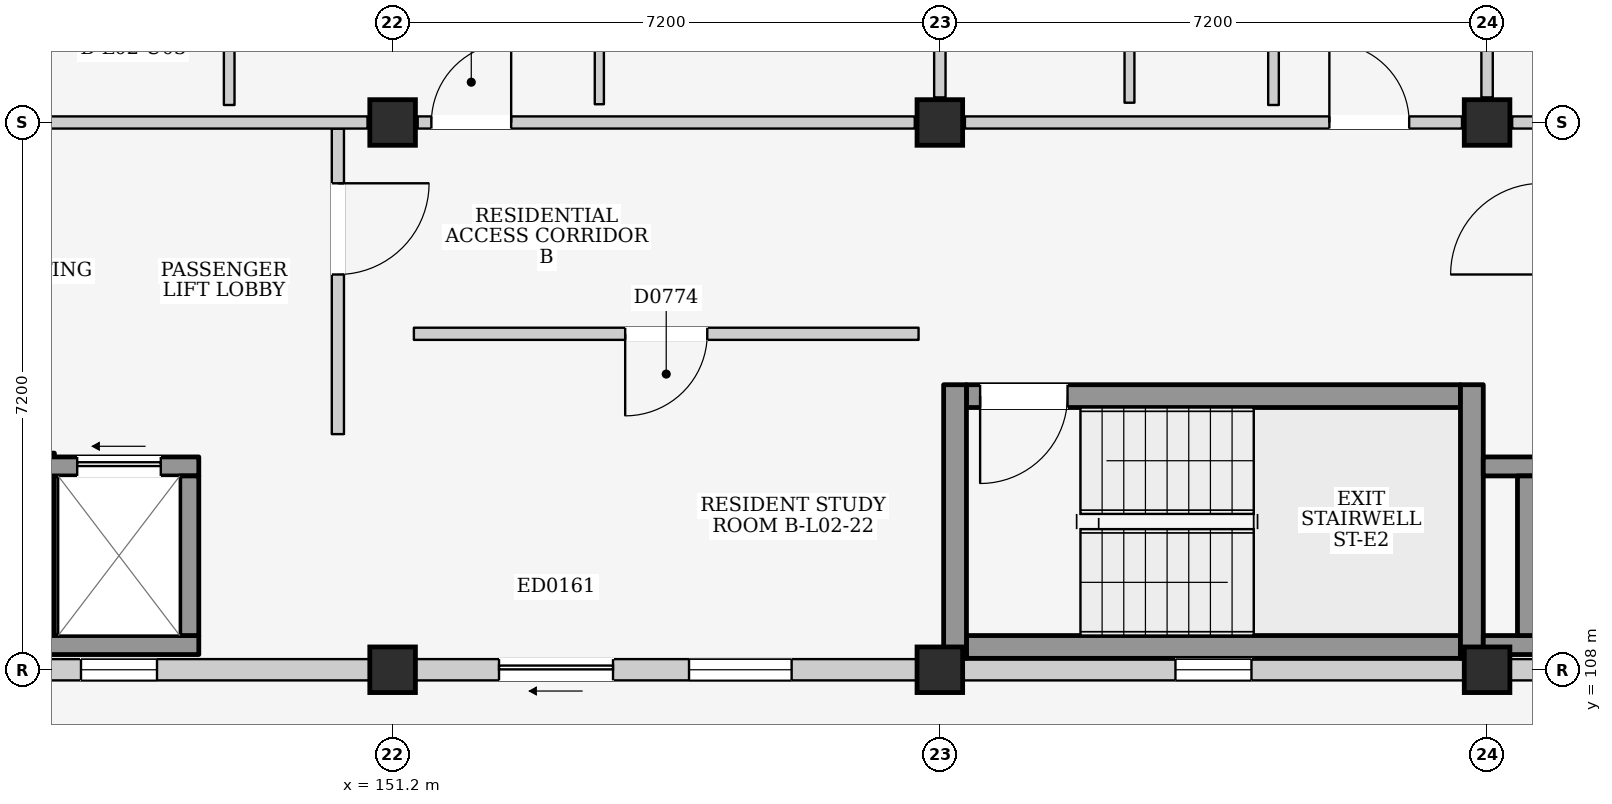
"""IFC4 building model, lengths in metres.
Left out: names, types, materials, properties, quantities, classifications, styles, units other than length and angle.
Written with IfcOpenShell. Run it as: python <this file> out.ifc"""

import sys

from ifc_helpers import new_model, si_unit, direction, frame, frame_2d, origin, origin_2d, place, context, subcontext, project, spatial, rectangle, extrude, element, fill, save


model = new_model("IFC4")
c1 = context("Model", 3, precision=1e-05, world=origin(), true_north=direction((0.0, 1.0)))
c2 = subcontext(c1, "Body", "Model", "MODEL_VIEW")
j1 = project(units=[si_unit("LENGTHUNIT", "METRE"), si_unit("PLANEANGLEUNIT", "RADIAN")], contexts=[c1])
p1 = place(None, origin())
s1 = spatial("IfcSite", under=j1, at=p1, CompositionType="ELEMENT")
p2 = place(p1, origin())
s2 = spatial("IfcBuilding", under=s1, at=p2, CompositionType="ELEMENT")
p3 = place(p2, frame((0.0, 0.0, 9.0)))
s3 = spatial("IfcBuildingStorey", under=s2, at=p3, CompositionType="ELEMENT", Elevation=9.0)
for number, where, z_axis, x_axis in (
    (1, (151.2, 108.0, 0.0), (0.0, 0.0, 1.0), (1.0, 0.0, 0.0)),
    (2, (151.2, 115.2, 0.0), (0.0, 0.0, 1.0), (1.0, 0.0, 0.0)),
    (3, (158.4, 108.0, 0.0), (0.0, 0.0, 1.0), (1.0, 0.0, 0.0)),
    (4, (158.4, 115.2, 0.0), (0.0, 0.0, 1.0), (1.0, 0.0, 0.0)),
    (5, (165.6, 108.0, 0.0), (0.0, 0.0, 1.0), (1.0, 0.0, 0.0)),
    (6, (165.6, 115.2, 0.0), (0.0, 0.0, 1.0), (1.0, 0.0, 0.0)),
):
    element("IfcColumn", number, at=place(p3, frame(where, z_axis=z_axis, x_axis=x_axis)), inside=s3, PredefinedType="COLUMN", context=c2, shape_type="SweptSolid", body=[
        extrude(rectangle(XDim=0.6, YDim=0.6, at=origin_2d()), origin(), (0.0, 0.0, 1.0), 3.2),
    ])
p4 = place(p3, frame((144.3, 108.0, 0.0), z_axis=(0.0, 0.0, 1.0), x_axis=(1.0, 0.0, 0.0)))
e7 = element("IfcWall", 7, at=p4, inside=s3, PredefinedType="ELEMENTEDWALL", context=c2, shape_type="SweptSolid", body=[
    extrude(rectangle(XDim=6.6, YDim=0.28, at=frame_2d((3.3, 0.0))), origin(), (0.0, 0.0, 1.0), 2.345),
])
p5 = place(p4, frame((2.8, 0.0, 1.2)))
e8 = element("IfcOpeningElement", 8, at=p5, cuts=e7, PredefinedType="OPENING", context=c2, shape_type="SweptSolid", body=[
    extrude(rectangle(XDim=1.0, YDim=0.9, at=frame_2d((0.5, 0.45))), frame((0.0, 0.155, 0.0), z_axis=(0.0, -1.0, 0.0), x_axis=(1.0, 0.0, 0.0)), (0.0, 0.0, 1.0), 0.31),
])
p6 = place(p3, frame((151.5, 108.0, 0.0), z_axis=(0.0, 0.0, 1.0), x_axis=(1.0, 0.0, 0.0)))
e9 = element("IfcWall", 9, at=p6, inside=s3, PredefinedType="ELEMENTEDWALL", context=c2, shape_type="SweptSolid", body=[
    extrude(rectangle(XDim=6.6, YDim=0.28, at=frame_2d((3.3, 0.0))), origin(), (0.0, 0.0, 1.0), 2.345),
])
p7 = place(p6, frame((1.1, 0.0, 0.0)))
e10 = element("IfcOpeningElement", 10, at=p7, cuts=e9, PredefinedType="OPENING", context=c2, shape_type="SweptSolid", body=[
    extrude(rectangle(XDim=1.5, YDim=2.12, at=frame_2d((0.75, 1.06))), frame((0.0, 0.155, 0.0), z_axis=(0.0, -1.0, 0.0), x_axis=(1.0, 0.0, 0.0)), (0.0, 0.0, 1.0), 0.31),
])
p8 = place(p6, frame((3.6, 0.0, 0.735)))
e11 = element("IfcOpeningElement", 11, at=p8, cuts=e9, PredefinedType="OPENING", context=c2, shape_type="SweptSolid", body=[
    extrude(rectangle(XDim=1.35, YDim=1.5, at=frame_2d((0.675, 0.75))), frame((0.0, 0.155, 0.0), z_axis=(0.0, -1.0, 0.0), x_axis=(1.0, 0.0, 0.0)), (0.0, 0.0, 1.0), 0.31),
])
p9 = place(p3, frame((158.7, 108.0, 0.0), z_axis=(0.0, 0.0, 1.0), x_axis=(1.0, 0.0, 0.0)))
e12 = element("IfcWall", 12, at=p9, inside=s3, PredefinedType="ELEMENTEDWALL", context=c2, shape_type="SweptSolid", body=[
    extrude(rectangle(XDim=6.6, YDim=0.28, at=frame_2d((3.3, 0.0))), origin(), (0.0, 0.0, 1.0), 2.345),
])
p10 = place(p9, frame((2.8, 0.0, 1.2)))
e13 = element("IfcOpeningElement", 13, at=p10, cuts=e12, PredefinedType="OPENING", context=c2, shape_type="SweptSolid", body=[
    extrude(rectangle(XDim=1.0, YDim=0.9, at=frame_2d((0.5, 0.45))), frame((0.0, 0.155, 0.0), z_axis=(0.0, -1.0, 0.0), x_axis=(1.0, 0.0, 0.0)), (0.0, 0.0, 1.0), 0.31),
])
p11 = place(p3, frame((165.9, 108.0, 0.0), z_axis=(0.0, 0.0, 1.0), x_axis=(1.0, 0.0, 0.0)))
e14 = element("IfcWall", 14, at=p11, inside=s3, PredefinedType="ELEMENTEDWALL", context=c2, shape_type="SweptSolid", body=[
    extrude(rectangle(XDim=6.6, YDim=0.28, at=frame_2d((3.3, 0.0))), origin(), (0.0, 0.0, 1.0), 2.345),
])
p12 = place(p11, frame((2.8, 0.0, 1.2)))
e15 = element("IfcOpeningElement", 15, at=p12, cuts=e14, PredefinedType="OPENING", context=c2, shape_type="SweptSolid", body=[
    extrude(rectangle(XDim=1.0, YDim=0.9, at=frame_2d((0.5, 0.45))), frame((0.0, 0.155, 0.0), z_axis=(0.0, -1.0, 0.0), x_axis=(1.0, 0.0, 0.0)), (0.0, 0.0, 1.0), 0.31),
])
p13 = place(p3, frame((150.48, 111.1, 0.0), z_axis=(0.0, 0.0, 1.0), x_axis=(0.0, 1.0, 0.0)))
e16 = element("IfcWall", 16, at=p13, inside=s3, PredefinedType="PARTITIONING", context=c2, shape_type="SweptSolid", body=[
    extrude(rectangle(XDim=4.02, YDim=0.16, at=frame_2d((2.01, 0.0))), origin(), (0.0, 0.0, 1.0), 2.96),
])
p14 = place(p13, frame((2.1, 0.0, 0.0)))
e17 = element("IfcOpeningElement", 17, at=p14, cuts=e16, PredefinedType="OPENING", context=c2, shape_type="SweptSolid", body=[
    extrude(rectangle(XDim=1.2, YDim=2.2, at=frame_2d((0.6, 1.1))), frame((0.0, 0.095, 0.0), z_axis=(0.0, -1.0, 0.0), x_axis=(1.0, 0.0, 0.0)), (0.0, 0.0, 1.0), 0.19),
])
p15 = place(p3, frame((146.625, 108.45, 0.0), z_axis=(0.0, 0.0, 1.0), x_axis=(0.0, 1.0, 0.0)))
e18 = element("IfcWall", 18, at=p15, inside=s3, PredefinedType="SHEAR", context=c2, shape_type="SweptSolid", body=[
    extrude(rectangle(XDim=2.4, YDim=0.25, at=frame_2d((1.2, 0.0))), origin(), (0.0, 0.0, 1.0), 2.96),
])
p16 = place(p3, frame((146.625, 108.325, 0.0), z_axis=(0.0, 0.0, 1.0), x_axis=(1.0, 0.0, 0.0)))
e19 = element("IfcWall", 19, at=p16, inside=s3, PredefinedType="SHEAR", context=c2, shape_type="SweptSolid", body=[
    extrude(rectangle(XDim=2.025, YDim=0.25, at=frame_2d((1.012, 0.0))), origin(), (0.0, 0.0, 1.0), 2.96),
])
p17 = place(p3, frame((146.625, 110.675, 0.0), z_axis=(0.0, 0.0, 1.0), x_axis=(1.0, 0.0, 0.0)))
e20 = element("IfcWall", 20, at=p17, inside=s3, PredefinedType="SHEAR", context=c2, shape_type="SweptSolid", body=[
    extrude(rectangle(XDim=2.025, YDim=0.25, at=frame_2d((1.012, 0.0))), origin(), (0.0, 0.0, 1.0), 2.96),
])
p18 = place(p17, frame((0.425, 0.0, 0.0)))
e21 = element("IfcOpeningElement", 21, at=p18, cuts=e20, PredefinedType="OPENING", context=c2, shape_type="SweptSolid", body=[
    extrude(rectangle(XDim=1.1, YDim=2.15, at=frame_2d((0.55, 1.075))), frame((0.0, 0.14, 0.0), z_axis=(0.0, -1.0, 0.0), x_axis=(1.0, 0.0, 0.0)), (0.0, 0.0, 1.0), 0.28),
])
p19 = place(p3, frame((148.525, 108.45, 0.0), z_axis=(0.0, 0.0, 1.0), x_axis=(0.0, 1.0, 0.0)))
e22 = element("IfcWall", 22, at=p19, inside=s3, PredefinedType="SHEAR", context=c2, shape_type="SweptSolid", body=[
    extrude(rectangle(XDim=2.1, YDim=0.25, at=frame_2d((1.05, 0.0))), origin(), (0.0, 0.0, 1.0), 2.96),
])
p20 = place(p3, frame((158.75, 108.3, 0.0), z_axis=(0.0, 0.0, 1.0), x_axis=(1.0, 0.0, 0.0)))
e23 = element("IfcWall", 23, at=p20, inside=s3, PredefinedType="SHEAR", context=c2, shape_type="SweptSolid", body=[
    extrude(rectangle(XDim=6.5, YDim=0.3, at=frame_2d((3.25, 0.0))), origin(), (0.0, 0.0, 1.0), 2.96),
])
p21 = place(p3, frame((158.75, 111.6, 0.0), z_axis=(0.0, 0.0, 1.0), x_axis=(1.0, 0.0, 0.0)))
e24 = element("IfcWall", 24, at=p21, inside=s3, PredefinedType="SHEAR", context=c2, shape_type="SweptSolid", body=[
    extrude(rectangle(XDim=6.5, YDim=0.3, at=frame_2d((3.25, 0.0))), origin(), (0.0, 0.0, 1.0), 2.96),
])
p22 = place(p21, frame((0.18, 0.0, 0.0)))
e25 = element("IfcOpeningElement", 25, at=p22, cuts=e24, PredefinedType="OPENING", context=c2, shape_type="SweptSolid", body=[
    extrude(rectangle(XDim=1.15, YDim=2.2, at=frame_2d((0.575, 1.1))), frame((0.0, 0.165, 0.0), z_axis=(0.0, -1.0, 0.0), x_axis=(1.0, 0.0, 0.0)), (0.0, 0.0, 1.0), 0.33),
])
for number, where, z_axis, x_axis in (
    (26, (158.6, 108.15, 0.0), (0.0, 0.0, 1.0), (0.0, 1.0, 0.0)),
    (27, (165.4, 108.15, 0.0), (0.0, 0.0, 1.0), (0.0, 1.0, 0.0)),
):
    element("IfcWall", number, at=place(p3, frame(where, z_axis=z_axis, x_axis=x_axis)), inside=s3, PredefinedType="SHEAR", context=c2, shape_type="SweptSolid", body=[
        extrude(rectangle(XDim=3.6, YDim=0.3, at=frame_2d((1.8, 0.0))), origin(), (0.0, 0.0, 1.0), 2.96),
    ])
p23 = place(p3, frame((165.55, 108.325, 0.0), z_axis=(0.0, 0.0, 1.0), x_axis=(1.0, 0.0, 0.0)))
e28 = element("IfcWall", 28, at=p23, inside=s3, PredefinedType="SHEAR", context=c2, shape_type="SweptSolid", body=[
    extrude(rectangle(XDim=2.55, YDim=0.25, at=frame_2d((1.275, 0.0))), origin(), (0.0, 0.0, 1.0), 2.96),
])
p24 = place(p3, frame((165.55, 110.675, 0.0), z_axis=(0.0, 0.0, 1.0), x_axis=(1.0, 0.0, 0.0)))
e29 = element("IfcWall", 29, at=p24, inside=s3, PredefinedType="SHEAR", context=c2, shape_type="SweptSolid", body=[
    extrude(rectangle(XDim=2.55, YDim=0.25, at=frame_2d((1.275, 0.0))), origin(), (0.0, 0.0, 1.0), 2.96),
])
p25 = place(p24, frame((0.95, 0.0, 0.0)))
e30 = element("IfcOpeningElement", 30, at=p25, cuts=e29, PredefinedType="OPENING", context=c2, shape_type="SweptSolid", body=[
    extrude(rectangle(XDim=1.1, YDim=2.15, at=frame_2d((0.55, 1.075))), frame((0.0, 0.14, 0.0), z_axis=(0.0, -1.0, 0.0), x_axis=(1.0, 0.0, 0.0)), (0.0, 0.0, 1.0), 0.28),
])
p26 = place(p3, frame((166.125, 108.45, 0.0), z_axis=(0.0, 0.0, 1.0), x_axis=(0.0, 1.0, 0.0)))
e31 = element("IfcWall", 31, at=p26, inside=s3, PredefinedType="SHEAR", context=c2, shape_type="SweptSolid", body=[
    extrude(rectangle(XDim=2.1, YDim=0.25, at=frame_2d((1.05, 0.0))), origin(), (0.0, 0.0, 1.0), 2.96),
])
p27 = place(p3, frame((144.33, 115.2, 0.0), z_axis=(0.0, 0.0, 1.0), x_axis=(1.0, 0.0, 0.0)))
e32 = element("IfcWall", 32, at=p27, inside=s3, PredefinedType="PARTITIONING", context=c2, shape_type="SweptSolid", body=[
    extrude(rectangle(XDim=6.54, YDim=0.16, at=frame_2d((3.27, 0.0))), origin(), (0.0, 0.0, 1.0), 2.345),
])
p28 = place(p3, frame((151.53, 115.2, 0.0), z_axis=(0.0, 0.0, 1.0), x_axis=(1.0, 0.0, 0.0)))
e33 = element("IfcWall", 33, at=p28, inside=s3, PredefinedType="PARTITIONING", context=c2, shape_type="SweptSolid", body=[
    extrude(rectangle(XDim=6.54, YDim=0.16, at=frame_2d((3.27, 0.0))), origin(), (0.0, 0.0, 1.0), 2.345),
])
p29 = place(p28, frame((0.18, 0.0, 0.0)))
e34 = element("IfcOpeningElement", 34, at=p29, cuts=e33, PredefinedType="OPENING", context=c2, shape_type="SweptSolid", body=[
    extrude(rectangle(XDim=1.05, YDim=2.15, at=frame_2d((0.525, 1.075))), frame((0.0, 0.095, 0.0), z_axis=(0.0, -1.0, 0.0), x_axis=(1.0, 0.0, 0.0)), (0.0, 0.0, 1.0), 0.19),
])
p30 = place(p3, frame((158.4, 115.53, 0.0), z_axis=(0.0, 0.0, 1.0), x_axis=(0.0, 1.0, 0.0)))
e35 = element("IfcWall", 35, at=p30, inside=s3, PredefinedType="PARTITIONING", context=c2, shape_type="SweptSolid", body=[
    extrude(rectangle(XDim=6.54, YDim=0.15, at=frame_2d((3.27, 0.0))), origin(), (0.0, 0.0, 1.0), 2.395),
])
p31 = place(p3, frame((149.05, 115.43, 0.0), z_axis=(0.0, 0.0, 1.0), x_axis=(0.0, 1.0, 0.0)))
e36 = element("IfcWall", 36, at=p31, inside=s3, PredefinedType="PARTITIONING", context=c2, shape_type="SweptSolid", body=[
    extrude(rectangle(XDim=3.06, YDim=0.14, at=frame_2d((1.53, 0.0))), origin(), (0.0, 0.0, 1.0), 2.96),
])
p32 = place(p3, frame((153.92, 115.44, 0.0), z_axis=(0.0, 0.0, 1.0), x_axis=(0.0, 1.0, 0.0)))
e37 = element("IfcWall", 37, at=p32, inside=s3, PredefinedType="PARTITIONING", context=c2, shape_type="SweptSolid", body=[
    extrude(rectangle(XDim=3.04, YDim=0.12, at=frame_2d((1.52, 0.0))), origin(), (0.0, 0.0, 1.0), 2.96),
])
p33 = place(p32, frame((1.04, 0.0, 0.0)))
e38 = element("IfcOpeningElement", 38, at=p33, cuts=e37, PredefinedType="OPENING", context=c2, shape_type="SweptSolid", body=[
    extrude(rectangle(XDim=0.96, YDim=2.15, at=frame_2d((0.48, 1.075))), frame((0.0, 0.075, 0.0), z_axis=(0.0, -1.0, 0.0), x_axis=(1.0, 0.0, 0.0)), (0.0, 0.0, 1.0), 0.15),
])
p34 = place(p3, frame((158.73, 115.2, 0.0), z_axis=(0.0, 0.0, 1.0), x_axis=(1.0, 0.0, 0.0)))
e39 = element("IfcWall", 39, at=p34, inside=s3, PredefinedType="PARTITIONING", context=c2, shape_type="SweptSolid", body=[
    extrude(rectangle(XDim=6.54, YDim=0.16, at=frame_2d((3.27, 0.0))), origin(), (0.0, 0.0, 1.0), 2.345),
])
p35 = place(p34, frame((4.795, 0.0, 0.0)))
e40 = element("IfcOpeningElement", 40, at=p35, cuts=e39, PredefinedType="OPENING", context=c2, shape_type="SweptSolid", body=[
    extrude(rectangle(XDim=1.05, YDim=2.15, at=frame_2d((0.525, 1.075))), frame((0.0, 0.095, 0.0), z_axis=(0.0, -1.0, 0.0), x_axis=(1.0, 0.0, 0.0)), (0.0, 0.0, 1.0), 0.19),
])
p36 = place(p3, frame((165.6, 115.53, 0.0), z_axis=(0.0, 0.0, 1.0), x_axis=(0.0, 1.0, 0.0)))
e41 = element("IfcWall", 41, at=p36, inside=s3, PredefinedType="PARTITIONING", context=c2, shape_type="SweptSolid", body=[
    extrude(rectangle(XDim=6.54, YDim=0.15, at=frame_2d((3.27, 0.0))), origin(), (0.0, 0.0, 1.0), 2.395),
])
p37 = place(p3, frame((160.895, 115.46, 0.0), z_axis=(0.0, 0.0, 1.0), x_axis=(0.0, 1.0, 0.0)))
e42 = element("IfcWall", 42, at=p37, inside=s3, PredefinedType="PARTITIONING", context=c2, shape_type="SweptSolid", body=[
    extrude(rectangle(XDim=2.33, YDim=0.13, at=frame_2d((1.165, 0.0))), origin(), (0.0, 0.0, 1.0), 2.96),
])
p38 = place(p3, frame((162.79, 115.43, 0.0), z_axis=(0.0, 0.0, 1.0), x_axis=(0.0, 1.0, 0.0)))
e43 = element("IfcWall", 43, at=p38, inside=s3, PredefinedType="PARTITIONING", context=c2, shape_type="SweptSolid", body=[
    extrude(rectangle(XDim=2.35, YDim=0.14, at=frame_2d((1.175, 0.0))), origin(), (0.0, 0.0, 1.0), 2.96),
])
p39 = place(p3, frame((165.93, 115.2, 0.0), z_axis=(0.0, 0.0, 1.0), x_axis=(1.0, 0.0, 0.0)))
e44 = element("IfcWall", 44, at=p39, inside=s3, PredefinedType="PARTITIONING", context=c2, shape_type="SweptSolid", body=[
    extrude(rectangle(XDim=6.54, YDim=0.16, at=frame_2d((3.27, 0.0))), origin(), (0.0, 0.0, 1.0), 2.345),
])
p40 = place(p3, frame((151.48, 112.42, 0.0), z_axis=(0.0, 0.0, 1.0), x_axis=(1.0, 0.0, 0.0)))
e45 = element("IfcWall", 45, at=p40, inside=s3, PredefinedType="PARTITIONING", context=c2, shape_type="SweptSolid", body=[
    extrude(rectangle(XDim=6.64, YDim=0.16, at=frame_2d((3.32, 0.0))), origin(), (0.0, 0.0, 1.0), 2.96),
])
p41 = place(p40, frame((2.78, 0.0, 0.0)))
e46 = element("IfcOpeningElement", 46, at=p41, cuts=e45, PredefinedType="OPENING", context=c2, shape_type="SweptSolid", body=[
    extrude(rectangle(XDim=1.08, YDim=2.22, at=frame_2d((0.54, 1.11))), frame((0.0, 0.095, 0.0), z_axis=(0.0, -1.0, 0.0), x_axis=(1.0, 0.0, 0.0)), (0.0, 0.0, 1.0), 0.19),
])
p42 = place(p5, origin())
e47 = element("IfcWindow", 47, at=p42, inside=s3, PartitioningType="SINGLE_PANEL", PredefinedType="WINDOW", context=c2, shape_type="SweptSolid", body=[
    extrude(rectangle(XDim=1.0, YDim=0.9, at=frame_2d((0.5, 0.45))), frame((0.0, 0.03, 0.0), z_axis=(0.0, -1.0, 0.0), x_axis=(1.0, 0.0, 0.0)), (0.0, 0.0, 1.0), 0.06),
])
fill(e8, e47)
p43 = place(p7, frame((1.5, 0.0, 0.0), z_axis=(0.0, 0.0, 1.0), x_axis=(-1.0, 0.0, 0.0)))
e48 = element("IfcDoor", 48, at=p43, inside=s3, OperationType="SLIDING_TO_LEFT", PredefinedType="DOOR", context=c2, shape_type="SweptSolid", body=[
    extrude(rectangle(XDim=1.5, YDim=2.12, at=frame_2d((0.75, 1.06))), frame((0.0, 0.025, 0.0), z_axis=(0.0, -1.0, 0.0), x_axis=(1.0, 0.0, 0.0)), (0.0, 0.0, 1.0), 0.05),
])
fill(e10, e48)
p44 = place(p8, origin())
e49 = element("IfcWindow", 49, at=p44, inside=s3, PartitioningType="SINGLE_PANEL", PredefinedType="WINDOW", context=c2, shape_type="SweptSolid", body=[
    extrude(rectangle(XDim=1.35, YDim=1.5, at=frame_2d((0.675, 0.75))), frame((0.0, 0.03, 0.0), z_axis=(0.0, -1.0, 0.0), x_axis=(1.0, 0.0, 0.0)), (0.0, 0.0, 1.0), 0.06),
])
fill(e11, e49)
p45 = place(p10, origin())
e50 = element("IfcWindow", 50, at=p45, inside=s3, PartitioningType="SINGLE_PANEL", PredefinedType="WINDOW", context=c2, shape_type="SweptSolid", body=[
    extrude(rectangle(XDim=1.0, YDim=0.9, at=frame_2d((0.5, 0.45))), frame((0.0, 0.03, 0.0), z_axis=(0.0, -1.0, 0.0), x_axis=(1.0, 0.0, 0.0)), (0.0, 0.0, 1.0), 0.06),
])
fill(e13, e50)
p46 = place(p14, frame((1.2, 0.0, 0.0), z_axis=(0.0, 0.0, 1.0), x_axis=(-1.0, 0.0, 0.0)))
e51 = element("IfcDoor", 51, at=p46, inside=s3, OperationType="SINGLE_SWING_LEFT", PredefinedType="DOOR", context=c2, shape_type="SweptSolid", body=[
    extrude(rectangle(XDim=1.2, YDim=2.2, at=frame_2d((0.6, 1.1))), frame((0.0, 0.025, 0.0), z_axis=(0.0, -1.0, 0.0), x_axis=(1.0, 0.0, 0.0)), (0.0, 0.0, 1.0), 0.05),
])
fill(e17, e51)
p47 = place(p18, origin())
e52 = element("IfcDoor", 52, at=p47, inside=s3, OperationType="SLIDING_TO_LEFT", PredefinedType="DOOR", context=c2, shape_type="SweptSolid", body=[
    extrude(rectangle(XDim=1.1, YDim=2.15, at=frame_2d((0.55, 1.075))), frame((0.0, 0.025, 0.0), z_axis=(0.0, -1.0, 0.0), x_axis=(1.0, 0.0, 0.0)), (0.0, 0.0, 1.0), 0.05),
])
fill(e21, e52)
p48 = place(p22, frame((1.15, 0.0, 0.0), z_axis=(0.0, 0.0, 1.0), x_axis=(-1.0, 0.0, 0.0)))
e53 = element("IfcDoor", 53, at=p48, inside=s3, OperationType="SINGLE_SWING_RIGHT", PredefinedType="DOOR", context=c2, shape_type="SweptSolid", body=[
    extrude(rectangle(XDim=1.15, YDim=2.2, at=frame_2d((0.575, 1.1))), frame((0.0, 0.025, 0.0), z_axis=(0.0, -1.0, 0.0), x_axis=(1.0, 0.0, 0.0)), (0.0, 0.0, 1.0), 0.05),
])
fill(e25, e53)
p49 = place(p29, origin())
e54 = element("IfcDoor", 54, at=p49, inside=s3, OperationType="SINGLE_SWING_RIGHT", PredefinedType="DOOR", context=c2, shape_type="SweptSolid", body=[
    extrude(rectangle(XDim=1.05, YDim=2.15, at=frame_2d((0.525, 1.075))), frame((0.0, 0.025, 0.0), z_axis=(0.0, -1.0, 0.0), x_axis=(1.0, 0.0, 0.0)), (0.0, 0.0, 1.0), 0.05),
])
fill(e34, e54)
p50 = place(p35, origin())
e55 = element("IfcDoor", 55, at=p50, inside=s3, OperationType="SINGLE_SWING_LEFT", PredefinedType="DOOR", context=c2, shape_type="SweptSolid", body=[
    extrude(rectangle(XDim=1.05, YDim=2.15, at=frame_2d((0.525, 1.075))), frame((0.0, 0.025, 0.0), z_axis=(0.0, -1.0, 0.0), x_axis=(1.0, 0.0, 0.0)), (0.0, 0.0, 1.0), 0.05),
])
fill(e40, e55)
p51 = place(p41, frame((1.08, 0.0, 0.0), z_axis=(0.0, 0.0, 1.0), x_axis=(-1.0, 0.0, 0.0)))
e56 = element("IfcDoor", 56, at=p51, inside=s3, OperationType="SINGLE_SWING_RIGHT", PredefinedType="DOOR", context=c2, shape_type="SweptSolid", body=[
    extrude(rectangle(XDim=1.08, YDim=2.22, at=frame_2d((0.54, 1.11))), frame((0.0, 0.025, 0.0), z_axis=(0.0, -1.0, 0.0), x_axis=(1.0, 0.0, 0.0)), (0.0, 0.0, 1.0), 0.05),
])
fill(e46, e56)
save(model, sys.argv[1])
